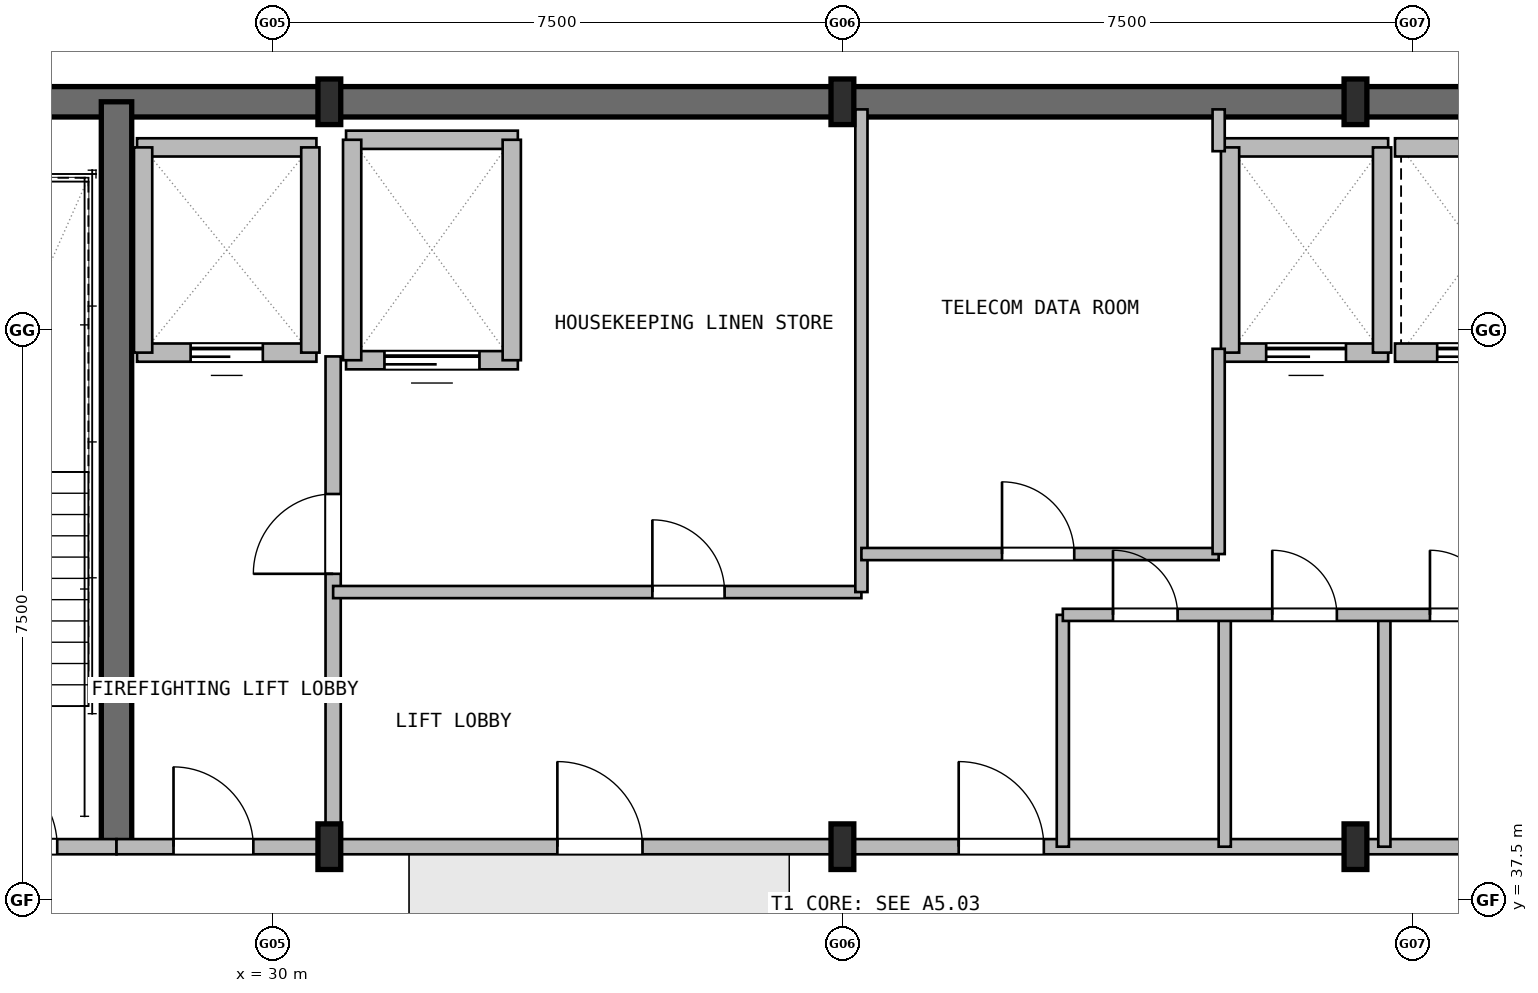
"""IFC4 building model, lengths in metres.
Left out: names, types, materials, properties, quantities, classifications, styles, units other than length and angle.
Written with IfcOpenShell. Run it as: python <this file> out.ifc"""

import sys

from ifc_helpers import new_model, si_unit, direction, frame, frame_2d, origin, origin_2d, place, context, subcontext, project, spatial, rectangle, i_section, extrude, element, fill, save


model = new_model("IFC4")
c1 = context("Model", 3, precision=1e-05, world=origin(), true_north=direction((0.0, 1.0)))
c2 = subcontext(c1, "Body", "Model", "MODEL_VIEW")
j1 = project(units=[si_unit("LENGTHUNIT", "METRE"), si_unit("PLANEANGLEUNIT", "RADIAN")], contexts=[c1])
p1 = place(None, origin())
s1 = spatial("IfcSite", under=j1, at=p1, CompositionType="ELEMENT")
p2 = place(p1, origin())
s2 = spatial("IfcBuilding", under=s1, at=p2, CompositionType="ELEMENT")
p3 = place(p2, frame((0.0, 0.0, 197.1)))
s3 = spatial("IfcBuildingStorey", under=s2, at=p3, CompositionType="ELEMENT", Elevation=197.1)
p4 = place(p3, frame((23.8, 48.0, 0.0), z_axis=(0.0, 0.0, 1.0), x_axis=(1.0, 0.0, 0.0)))
e1 = element("IfcWall", 1, at=p4, inside=s3, PredefinedType="SHEAR", context=c2, shape_type="SweptSolid", body=[
    extrude(rectangle(XDim=27.4, YDim=0.4, at=frame_2d((13.7, 0.0))), origin(), (0.0, 0.0, 1.0), 4.2),
])
p5 = place(p3, frame((27.95, 38.2, 0.0), z_axis=(0.0, 0.0, 1.0), x_axis=(0.0, 1.0, 0.0)))
e2 = element("IfcWall", 2, at=p5, inside=s3, PredefinedType="SHEAR", context=c2, shape_type="SweptSolid", body=[
    extrude(rectangle(XDim=9.8, YDim=0.4, at=frame_2d((4.9, 0.0))), origin(), (0.0, 0.0, 1.0), 4.2),
])
for number, where, z_axis, x_axis in (
    (3, (30.75, 38.2, 0.0), (0.0, 0.0, 1.0), (1.0, 0.0, 0.0)),
    (4, (30.75, 48.0, 0.0), (0.0, 0.0, 1.0), (1.0, 0.0, 0.0)),
    (5, (37.5, 38.2, 0.0), (0.0, 0.0, 1.0), (1.0, 0.0, 0.0)),
    (6, (37.5, 48.0, 0.0), (0.0, 0.0, 1.0), (1.0, 0.0, 0.0)),
    (7, (44.25, 38.2, 0.0), (0.0, 0.0, 1.0), (1.0, 0.0, 0.0)),
    (8, (44.25, 48.0, 0.0), (0.0, 0.0, 1.0), (1.0, 0.0, 0.0)),
):
    element("IfcColumn", number, at=place(p3, frame(where, z_axis=z_axis, x_axis=x_axis)), inside=s3, PredefinedType="COLUMN", context=c2, shape_type="SweptSolid", body=[
        extrude(i_section(OverallWidth=0.3, OverallDepth=0.6, WebThickness=0.014, FlangeThickness=0.025, at=origin_2d()), origin(), (0.0, 0.0, 1.0), 4.2),
    ])
p6 = place(p3, frame((24.0, 38.2, 0.0), z_axis=(0.0, 0.0, 1.0), x_axis=(1.0, 0.0, 0.0)))
e9 = element("IfcWall", 9, at=p6, inside=s3, PredefinedType="PARTITIONING", context=c2, shape_type="SweptSolid", body=[
    extrude(rectangle(XDim=3.95, YDim=0.2, at=frame_2d((1.975, 0.0))), origin(), (0.0, 0.0, 1.0), 3.28),
])
p7 = place(p6, frame((2.05, 0.0, 0.0)))
e10 = element("IfcOpeningElement", 10, at=p7, cuts=e9, PredefinedType="OPENING", context=c2, shape_type="SweptSolid", body=[
    extrude(rectangle(XDim=1.12, YDim=2.1, at=frame_2d((0.56, 1.05))), frame((0.0, 0.11, 0.0), z_axis=(0.0, -1.0, 0.0), x_axis=(1.0, 0.0, 0.0)), (0.0, 0.0, 1.0), 0.22),
])
p8 = place(p3, frame((30.8, 38.2, 0.0), z_axis=(0.0, 0.0, 1.0), x_axis=(0.0, 1.0, 0.0)))
e11 = element("IfcWall", 11, at=p8, inside=s3, PredefinedType="PARTITIONING", context=c2, shape_type="SweptSolid", body=[
    extrude(rectangle(XDim=6.45, YDim=0.2, at=frame_2d((3.225, 0.0))), origin(), (0.0, 0.0, 1.0), 3.28),
])
p9 = place(p8, frame((3.59, 0.0, 0.0)))
e12 = element("IfcOpeningElement", 12, at=p9, cuts=e11, PredefinedType="OPENING", context=c2, shape_type="SweptSolid", body=[
    extrude(rectangle(XDim=1.05, YDim=2.1, at=frame_2d((0.525, 1.05))), frame((0.0, 0.11, 0.0), z_axis=(0.0, -1.0, 0.0), x_axis=(1.0, 0.0, 0.0)), (0.0, 0.0, 1.0), 0.22),
])
p10 = place(p3, frame((27.95, 38.2, 0.0), z_axis=(0.0, 0.0, 1.0), x_axis=(1.0, 0.0, 0.0)))
e13 = element("IfcWall", 13, at=p10, inside=s3, PredefinedType="PARTITIONING", context=c2, shape_type="SweptSolid", body=[
    extrude(rectangle(XDim=2.85, YDim=0.2, at=frame_2d((1.425, 0.0))), origin(), (0.0, 0.0, 1.0), 3.28),
])
p11 = place(p10, frame((0.75, 0.0, 0.0)))
e14 = element("IfcOpeningElement", 14, at=p11, cuts=e13, PredefinedType="OPENING", context=c2, shape_type="SweptSolid", body=[
    extrude(rectangle(XDim=1.05, YDim=2.1, at=frame_2d((0.525, 1.05))), frame((0.0, 0.11, 0.0), z_axis=(0.0, -1.0, 0.0), x_axis=(1.0, 0.0, 0.0)), (0.0, 0.0, 1.0), 0.22),
])
p12 = place(p3, frame((30.8, 38.2, 0.0), z_axis=(0.0, 0.0, 1.0), x_axis=(1.0, 0.0, 0.0)))
e15 = element("IfcWall", 15, at=p12, inside=s3, PredefinedType="PARTITIONING", context=c2, shape_type="SweptSolid", body=[
    extrude(rectangle(XDim=16.35, YDim=0.2, at=frame_2d((8.175, 0.0))), origin(), (0.0, 0.0, 1.0), 3.28),
])
p13 = place(p12, frame((2.95, 0.0, 0.0)))
e16 = element("IfcOpeningElement", 16, at=p13, cuts=e15, PredefinedType="OPENING", context=c2, shape_type="SweptSolid", body=[
    extrude(rectangle(XDim=1.12, YDim=2.1, at=frame_2d((0.56, 1.05))), frame((0.0, 0.11, 0.0), z_axis=(0.0, -1.0, 0.0), x_axis=(1.0, 0.0, 0.0)), (0.0, 0.0, 1.0), 0.22),
])
p14 = place(p12, frame((8.23, 0.0, 0.0)))
e17 = element("IfcOpeningElement", 17, at=p14, cuts=e15, PredefinedType="OPENING", context=c2, shape_type="SweptSolid", body=[
    extrude(rectangle(XDim=1.12, YDim=2.1, at=frame_2d((0.56, 1.05))), frame((0.0, 0.11, 0.0), z_axis=(0.0, -1.0, 0.0), x_axis=(1.0, 0.0, 0.0)), (0.0, 0.0, 1.0), 0.22),
])
p15 = place(p3, frame((28.22, 44.7, 0.0), z_axis=(0.0, 0.0, 1.0), x_axis=(1.0, 0.0, 0.0)))
e18 = element("IfcWall", 18, at=p15, inside=s3, PredefinedType="PARTITIONING", context=c2, shape_type="SweptSolid", body=[
    extrude(rectangle(XDim=2.36, YDim=0.24, at=frame_2d((1.18, 0.0))), origin(), (0.0, 0.0, 1.0), 3.58),
])
p16 = place(p15, frame((0.705, 0.0, 0.0)))
e19 = element("IfcOpeningElement", 19, at=p16, cuts=e18, PredefinedType="OPENING", context=c2, shape_type="SweptSolid", body=[
    extrude(rectangle(XDim=0.95, YDim=2.15, at=frame_2d((0.475, 1.075))), frame((0.0, 0.13, 0.0), z_axis=(0.0, -1.0, 0.0), x_axis=(1.0, 0.0, 0.0)), (0.0, 0.0, 1.0), 0.26),
])
p17 = place(p3, frame((28.22, 47.4, 0.0), z_axis=(0.0, 0.0, 1.0), x_axis=(1.0, 0.0, 0.0)))
e20 = element("IfcWall", 20, at=p17, inside=s3, PredefinedType="PARTITIONING", context=c2, shape_type="SweptSolid", body=[
    extrude(rectangle(XDim=2.36, YDim=0.24, at=frame_2d((1.18, 0.0))), origin(), (0.0, 0.0, 1.0), 3.88),
])
p18 = place(p3, frame((28.3, 44.7, 0.0), z_axis=(0.0, 0.0, 1.0), x_axis=(0.0, 1.0, 0.0)))
e21 = element("IfcWall", 21, at=p18, inside=s3, PredefinedType="PARTITIONING", context=c2, shape_type="SweptSolid", body=[
    extrude(rectangle(XDim=2.7, YDim=0.24, at=frame_2d((1.35, 0.0))), origin(), (0.0, 0.0, 1.0), 3.88),
])
p19 = place(p3, frame((30.5, 44.7, 0.0), z_axis=(0.0, 0.0, 1.0), x_axis=(0.0, 1.0, 0.0)))
e22 = element("IfcWall", 22, at=p19, inside=s3, PredefinedType="PARTITIONING", context=c2, shape_type="SweptSolid", body=[
    extrude(rectangle(XDim=2.7, YDim=0.24, at=frame_2d((1.35, 0.0))), origin(), (0.0, 0.0, 1.0), 3.28),
])
p20 = place(p3, frame((30.97, 44.6, 0.0), z_axis=(0.0, 0.0, 1.0), x_axis=(1.0, 0.0, 0.0)))
e23 = element("IfcWall", 23, at=p20, inside=s3, PredefinedType="PARTITIONING", context=c2, shape_type="SweptSolid", body=[
    extrude(rectangle(XDim=2.26, YDim=0.24, at=frame_2d((1.13, 0.0))), origin(), (0.0, 0.0, 1.0), 3.88),
])
p21 = place(p20, frame((0.505, 0.0, 0.0)))
e24 = element("IfcOpeningElement", 24, at=p21, cuts=e23, PredefinedType="OPENING", context=c2, shape_type="SweptSolid", body=[
    extrude(rectangle(XDim=1.25, YDim=2.2, at=frame_2d((0.625, 1.1))), frame((0.0, 0.13, 0.0), z_axis=(0.0, -1.0, 0.0), x_axis=(1.0, 0.0, 0.0)), (0.0, 0.0, 1.0), 0.26),
])
p22 = place(p3, frame((30.97, 47.5, 0.0), z_axis=(0.0, 0.0, 1.0), x_axis=(1.0, 0.0, 0.0)))
e25 = element("IfcWall", 25, at=p22, inside=s3, PredefinedType="PARTITIONING", context=c2, shape_type="SweptSolid", body=[
    extrude(rectangle(XDim=2.26, YDim=0.24, at=frame_2d((1.13, 0.0))), origin(), (0.0, 0.0, 1.0), 3.88),
])
for number, where, z_axis, x_axis in (
    (26, (31.05, 44.6, 0.0), (0.0, 0.0, 1.0), (0.0, 1.0, 0.0)),
    (27, (33.15, 44.6, 0.0), (0.0, 0.0, 1.0), (0.0, 1.0, 0.0)),
):
    element("IfcWall", number, at=place(p3, frame(where, z_axis=z_axis, x_axis=x_axis)), inside=s3, PredefinedType="PARTITIONING", context=c2, shape_type="SweptSolid", body=[
        extrude(rectangle(XDim=2.9, YDim=0.24, at=frame_2d((1.45, 0.0))), origin(), (0.0, 0.0, 1.0), 3.88),
    ])
p23 = place(p3, frame((42.52, 44.7, 0.0), z_axis=(0.0, 0.0, 1.0), x_axis=(1.0, 0.0, 0.0)))
e28 = element("IfcWall", 28, at=p23, inside=s3, PredefinedType="PARTITIONING", context=c2, shape_type="SweptSolid", body=[
    extrude(rectangle(XDim=2.16, YDim=0.24, at=frame_2d((1.08, 0.0))), origin(), (0.0, 0.0, 1.0), 3.88),
])
p24 = place(p23, frame((0.555, 0.0, 0.0)))
e29 = element("IfcOpeningElement", 29, at=p24, cuts=e28, PredefinedType="OPENING", context=c2, shape_type="SweptSolid", body=[
    extrude(rectangle(XDim=1.05, YDim=2.15, at=frame_2d((0.525, 1.075))), frame((0.0, 0.13, 0.0), z_axis=(0.0, -1.0, 0.0), x_axis=(1.0, 0.0, 0.0)), (0.0, 0.0, 1.0), 0.26),
])
p25 = place(p3, frame((42.52, 47.4, 0.0), z_axis=(0.0, 0.0, 1.0), x_axis=(1.0, 0.0, 0.0)))
e30 = element("IfcWall", 30, at=p25, inside=s3, PredefinedType="PARTITIONING", context=c2, shape_type="SweptSolid", body=[
    extrude(rectangle(XDim=2.16, YDim=0.24, at=frame_2d((1.08, 0.0))), origin(), (0.0, 0.0, 1.0), 3.88),
])
for number, where, z_axis, x_axis in (
    (31, (42.6, 44.7, 0.0), (0.0, 0.0, 1.0), (0.0, 1.0, 0.0)),
    (32, (44.6, 44.7, 0.0), (0.0, 0.0, 1.0), (0.0, 1.0, 0.0)),
):
    element("IfcWall", number, at=place(p3, frame(where, z_axis=z_axis, x_axis=x_axis)), inside=s3, PredefinedType="PARTITIONING", context=c2, shape_type="SweptSolid", body=[
        extrude(rectangle(XDim=2.7, YDim=0.24, at=frame_2d((1.35, 0.0))), origin(), (0.0, 0.0, 1.0), 3.88),
    ])
p26 = place(p3, frame((44.77, 44.7, 0.0), z_axis=(0.0, 0.0, 1.0), x_axis=(1.0, 0.0, 0.0)))
e33 = element("IfcWall", 33, at=p26, inside=s3, PredefinedType="PARTITIONING", context=c2, shape_type="SweptSolid", body=[
    extrude(rectangle(XDim=2.16, YDim=0.24, at=frame_2d((1.08, 0.0))), origin(), (0.0, 0.0, 1.0), 3.88),
])
p27 = place(p26, frame((0.555, 0.0, 0.0)))
e34 = element("IfcOpeningElement", 34, at=p27, cuts=e33, PredefinedType="OPENING", context=c2, shape_type="SweptSolid", body=[
    extrude(rectangle(XDim=1.05, YDim=2.15, at=frame_2d((0.525, 1.075))), frame((0.0, 0.13, 0.0), z_axis=(0.0, -1.0, 0.0), x_axis=(1.0, 0.0, 0.0)), (0.0, 0.0, 1.0), 0.26),
])
p28 = place(p3, frame((44.77, 47.4, 0.0), z_axis=(0.0, 0.0, 1.0), x_axis=(1.0, 0.0, 0.0)))
e35 = element("IfcWall", 35, at=p28, inside=s3, PredefinedType="PARTITIONING", context=c2, shape_type="SweptSolid", body=[
    extrude(rectangle(XDim=2.16, YDim=0.24, at=frame_2d((1.08, 0.0))), origin(), (0.0, 0.0, 1.0), 3.88),
])
p29 = place(p3, frame((30.8, 41.55, 0.0), z_axis=(0.0, 0.0, 1.0), x_axis=(1.0, 0.0, 0.0)))
e36 = element("IfcWall", 36, at=p29, inside=s3, PredefinedType="PARTITIONING", context=c2, shape_type="SweptSolid", body=[
    extrude(rectangle(XDim=6.95, YDim=0.16, at=frame_2d((3.475, 0.0))), origin(), (0.0, 0.0, 1.0), 3.88),
])
p30 = place(p29, frame((4.2, 0.0, 0.0)))
e37 = element("IfcOpeningElement", 37, at=p30, cuts=e36, PredefinedType="OPENING", context=c2, shape_type="SweptSolid", body=[
    extrude(rectangle(XDim=0.95, YDim=2.1, at=frame_2d((0.475, 1.05))), frame((0.0, 0.09, 0.0), z_axis=(0.0, -1.0, 0.0), x_axis=(1.0, 0.0, 0.0)), (0.0, 0.0, 1.0), 0.18),
])
p31 = place(p3, frame((37.75, 41.55, 0.0), z_axis=(0.0, 0.0, 1.0), x_axis=(0.0, 1.0, 0.0)))
e38 = element("IfcWall", 38, at=p31, inside=s3, PredefinedType="PARTITIONING", context=c2, shape_type="SweptSolid", body=[
    extrude(rectangle(XDim=6.35, YDim=0.16, at=frame_2d((3.175, 0.0))), origin(), (0.0, 0.0, 1.0), 3.88),
])
p32 = place(p3, frame((37.75, 42.05, 0.0), z_axis=(0.0, 0.0, 1.0), x_axis=(1.0, 0.0, 0.0)))
e39 = element("IfcWall", 39, at=p32, inside=s3, PredefinedType="PARTITIONING", context=c2, shape_type="SweptSolid", body=[
    extrude(rectangle(XDim=4.7, YDim=0.16, at=frame_2d((2.35, 0.0))), origin(), (0.0, 0.0, 1.0), 3.88),
])
p33 = place(p32, frame((1.85, 0.0, 0.0)))
e40 = element("IfcOpeningElement", 40, at=p33, cuts=e39, PredefinedType="OPENING", context=c2, shape_type="SweptSolid", body=[
    extrude(rectangle(XDim=0.95, YDim=2.1, at=frame_2d((0.475, 1.05))), frame((0.0, 0.09, 0.0), z_axis=(0.0, -1.0, 0.0), x_axis=(1.0, 0.0, 0.0)), (0.0, 0.0, 1.0), 0.18),
])
p34 = place(p3, frame((42.45, 42.05, 0.0), z_axis=(0.0, 0.0, 1.0), x_axis=(0.0, 1.0, 0.0)))
e41 = element("IfcWall", 41, at=p34, inside=s3, PredefinedType="PARTITIONING", context=c2, shape_type="SweptSolid", body=[
    extrude(rectangle(XDim=2.7, YDim=0.16, at=frame_2d((1.35, 0.0))), origin(), (0.0, 0.0, 1.0), 3.88),
])
p35 = place(p3, frame((42.45, 47.35, 0.0), z_axis=(0.0, 0.0, 1.0), x_axis=(0.0, 1.0, 0.0)))
e42 = element("IfcWall", 42, at=p35, inside=s3, PredefinedType="PARTITIONING", context=c2, shape_type="SweptSolid", body=[
    extrude(rectangle(XDim=0.55, YDim=0.16, at=frame_2d((0.275, 0.0))), origin(), (0.0, 0.0, 1.0), 3.88),
])
for number, where, z_axis, x_axis in (
    (43, (40.4, 38.2, 0.0), (0.0, 0.0, 1.0), (0.0, 1.0, 0.0)),
    (44, (42.53, 38.2, 0.0), (0.0, 0.0, 1.0), (0.0, 1.0, 0.0)),
    (45, (44.63, 38.2, 0.0), (0.0, 0.0, 1.0), (0.0, 1.0, 0.0)),
):
    element("IfcWall", number, at=place(p3, frame(where, z_axis=z_axis, x_axis=x_axis)), inside=s3, PredefinedType="PARTITIONING", context=c2, shape_type="SweptSolid", body=[
        extrude(rectangle(XDim=3.05, YDim=0.16, at=frame_2d((1.525, 0.0))), origin(), (0.0, 0.0, 1.0), 3.88),
    ])
p36 = place(p3, frame((40.4, 41.25, 0.0), z_axis=(0.0, 0.0, 1.0), x_axis=(1.0, 0.0, 0.0)))
e46 = element("IfcWall", 46, at=p36, inside=s3, PredefinedType="PARTITIONING", context=c2, shape_type="SweptSolid", body=[
    extrude(rectangle(XDim=6.75, YDim=0.16, at=frame_2d((3.375, 0.0))), origin(), (0.0, 0.0, 1.0), 3.88),
])
p37 = place(p36, frame((0.66, 0.0, 0.0)))
e47 = element("IfcOpeningElement", 47, at=p37, cuts=e46, PredefinedType="OPENING", context=c2, shape_type="SweptSolid", body=[
    extrude(rectangle(XDim=0.85, YDim=2.05, at=frame_2d((0.425, 1.025))), frame((0.0, 0.09, 0.0), z_axis=(0.0, -1.0, 0.0), x_axis=(1.0, 0.0, 0.0)), (0.0, 0.0, 1.0), 0.18),
])
p38 = place(p36, frame((2.755, 0.0, 0.0)))
e48 = element("IfcOpeningElement", 48, at=p38, cuts=e46, PredefinedType="OPENING", context=c2, shape_type="SweptSolid", body=[
    extrude(rectangle(XDim=0.85, YDim=2.05, at=frame_2d((0.425, 1.025))), frame((0.0, 0.09, 0.0), z_axis=(0.0, -1.0, 0.0), x_axis=(1.0, 0.0, 0.0)), (0.0, 0.0, 1.0), 0.18),
])
p39 = place(p36, frame((4.83, 0.0, 0.0)))
e49 = element("IfcOpeningElement", 49, at=p39, cuts=e46, PredefinedType="OPENING", context=c2, shape_type="SweptSolid", body=[
    extrude(rectangle(XDim=0.85, YDim=2.05, at=frame_2d((0.425, 1.025))), frame((0.0, 0.09, 0.0), z_axis=(0.0, -1.0, 0.0), x_axis=(1.0, 0.0, 0.0)), (0.0, 0.0, 1.0), 0.18),
])
p40 = place(p7, origin())
e50 = element("IfcDoor", 50, at=p40, inside=s3, OperationType="SINGLE_SWING_LEFT", PredefinedType="DOOR", context=c2, shape_type="SweptSolid", body=[
    extrude(rectangle(XDim=1.12, YDim=2.1, at=frame_2d((0.56, 1.05))), frame((0.0, 0.025, 0.0), z_axis=(0.0, -1.0, 0.0), x_axis=(1.0, 0.0, 0.0)), (0.0, 0.0, 1.0), 0.05),
])
fill(e10, e50)
p41 = place(p9, origin())
e51 = element("IfcDoor", 51, at=p41, inside=s3, OperationType="SINGLE_SWING_LEFT", PredefinedType="DOOR", context=c2, shape_type="SweptSolid", body=[
    extrude(rectangle(XDim=1.05, YDim=2.1, at=frame_2d((0.525, 1.05))), frame((0.0, 0.025, 0.0), z_axis=(0.0, -1.0, 0.0), x_axis=(1.0, 0.0, 0.0)), (0.0, 0.0, 1.0), 0.05),
])
fill(e12, e51)
p42 = place(p11, origin())
e52 = element("IfcDoor", 52, at=p42, inside=s3, OperationType="SINGLE_SWING_RIGHT", PredefinedType="DOOR", context=c2, shape_type="SweptSolid", body=[
    extrude(rectangle(XDim=1.05, YDim=2.1, at=frame_2d((0.525, 1.05))), frame((0.0, 0.025, 0.0), z_axis=(0.0, -1.0, 0.0), x_axis=(1.0, 0.0, 0.0)), (0.0, 0.0, 1.0), 0.05),
])
fill(e14, e52)
p43 = place(p13, origin())
e53 = element("IfcDoor", 53, at=p43, inside=s3, OperationType="SINGLE_SWING_LEFT", PredefinedType="DOOR", context=c2, shape_type="SweptSolid", body=[
    extrude(rectangle(XDim=1.12, YDim=2.1, at=frame_2d((0.56, 1.05))), frame((0.0, 0.025, 0.0), z_axis=(0.0, -1.0, 0.0), x_axis=(1.0, 0.0, 0.0)), (0.0, 0.0, 1.0), 0.05),
])
fill(e16, e53)
p44 = place(p14, origin())
e54 = element("IfcDoor", 54, at=p44, inside=s3, OperationType="SINGLE_SWING_RIGHT", PredefinedType="DOOR", context=c2, shape_type="SweptSolid", body=[
    extrude(rectangle(XDim=1.12, YDim=2.1, at=frame_2d((0.56, 1.05))), frame((0.0, 0.025, 0.0), z_axis=(0.0, -1.0, 0.0), x_axis=(1.0, 0.0, 0.0)), (0.0, 0.0, 1.0), 0.05),
])
fill(e17, e54)
p45 = place(p16, origin())
e55 = element("IfcDoor", 55, at=p45, inside=s3, OperationType="SLIDING_TO_LEFT", PredefinedType="DOOR", context=c2, shape_type="SweptSolid", body=[
    extrude(rectangle(XDim=0.95, YDim=2.15, at=frame_2d((0.475, 1.075))), frame((0.0, 0.025, 0.0), z_axis=(0.0, -1.0, 0.0), x_axis=(1.0, 0.0, 0.0)), (0.0, 0.0, 1.0), 0.05),
])
fill(e19, e55)
p46 = place(p21, origin())
e56 = element("IfcDoor", 56, at=p46, inside=s3, OperationType="SLIDING_TO_LEFT", PredefinedType="DOOR", context=c2, shape_type="SweptSolid", body=[
    extrude(rectangle(XDim=1.25, YDim=2.2, at=frame_2d((0.625, 1.1))), frame((0.0, 0.025, 0.0), z_axis=(0.0, -1.0, 0.0), x_axis=(1.0, 0.0, 0.0)), (0.0, 0.0, 1.0), 0.05),
])
fill(e24, e56)
p47 = place(p24, origin())
e57 = element("IfcDoor", 57, at=p47, inside=s3, OperationType="SLIDING_TO_LEFT", PredefinedType="DOOR", context=c2, shape_type="SweptSolid", body=[
    extrude(rectangle(XDim=1.05, YDim=2.15, at=frame_2d((0.525, 1.075))), frame((0.0, 0.025, 0.0), z_axis=(0.0, -1.0, 0.0), x_axis=(1.0, 0.0, 0.0)), (0.0, 0.0, 1.0), 0.05),
])
fill(e29, e57)
p48 = place(p27, origin())
e58 = element("IfcDoor", 58, at=p48, inside=s3, OperationType="SLIDING_TO_LEFT", PredefinedType="DOOR", context=c2, shape_type="SweptSolid", body=[
    extrude(rectangle(XDim=1.05, YDim=2.15, at=frame_2d((0.525, 1.075))), frame((0.0, 0.025, 0.0), z_axis=(0.0, -1.0, 0.0), x_axis=(1.0, 0.0, 0.0)), (0.0, 0.0, 1.0), 0.05),
])
fill(e34, e58)
p49 = place(p30, origin())
e59 = element("IfcDoor", 59, at=p49, inside=s3, OperationType="SINGLE_SWING_RIGHT", PredefinedType="DOOR", context=c2, shape_type="SweptSolid", body=[
    extrude(rectangle(XDim=0.95, YDim=2.1, at=frame_2d((0.475, 1.05))), frame((0.0, 0.025, 0.0), z_axis=(0.0, -1.0, 0.0), x_axis=(1.0, 0.0, 0.0)), (0.0, 0.0, 1.0), 0.05),
])
fill(e37, e59)
p50 = place(p33, origin())
e60 = element("IfcDoor", 60, at=p50, inside=s3, OperationType="SINGLE_SWING_LEFT", PredefinedType="DOOR", context=c2, shape_type="SweptSolid", body=[
    extrude(rectangle(XDim=0.95, YDim=2.1, at=frame_2d((0.475, 1.05))), frame((0.0, 0.025, 0.0), z_axis=(0.0, -1.0, 0.0), x_axis=(1.0, 0.0, 0.0)), (0.0, 0.0, 1.0), 0.05),
])
fill(e40, e60)
p51 = place(p37, origin())
e61 = element("IfcDoor", 61, at=p51, inside=s3, OperationType="SINGLE_SWING_RIGHT", PredefinedType="DOOR", context=c2, shape_type="SweptSolid", body=[
    extrude(rectangle(XDim=0.85, YDim=2.05, at=frame_2d((0.425, 1.025))), frame((0.0, 0.025, 0.0), z_axis=(0.0, -1.0, 0.0), x_axis=(1.0, 0.0, 0.0)), (0.0, 0.0, 1.0), 0.05),
])
fill(e47, e61)
p52 = place(p38, origin())
e62 = element("IfcDoor", 62, at=p52, inside=s3, OperationType="SINGLE_SWING_LEFT", PredefinedType="DOOR", context=c2, shape_type="SweptSolid", body=[
    extrude(rectangle(XDim=0.85, YDim=2.05, at=frame_2d((0.425, 1.025))), frame((0.0, 0.025, 0.0), z_axis=(0.0, -1.0, 0.0), x_axis=(1.0, 0.0, 0.0)), (0.0, 0.0, 1.0), 0.05),
])
fill(e48, e62)
p53 = place(p39, origin())
e63 = element("IfcDoor", 63, at=p53, inside=s3, OperationType="SINGLE_SWING_RIGHT", PredefinedType="DOOR", context=c2, shape_type="SweptSolid", body=[
    extrude(rectangle(XDim=0.85, YDim=2.05, at=frame_2d((0.425, 1.025))), frame((0.0, 0.025, 0.0), z_axis=(0.0, -1.0, 0.0), x_axis=(1.0, 0.0, 0.0)), (0.0, 0.0, 1.0), 0.05),
])
fill(e49, e63)
save(model, sys.argv[1])
